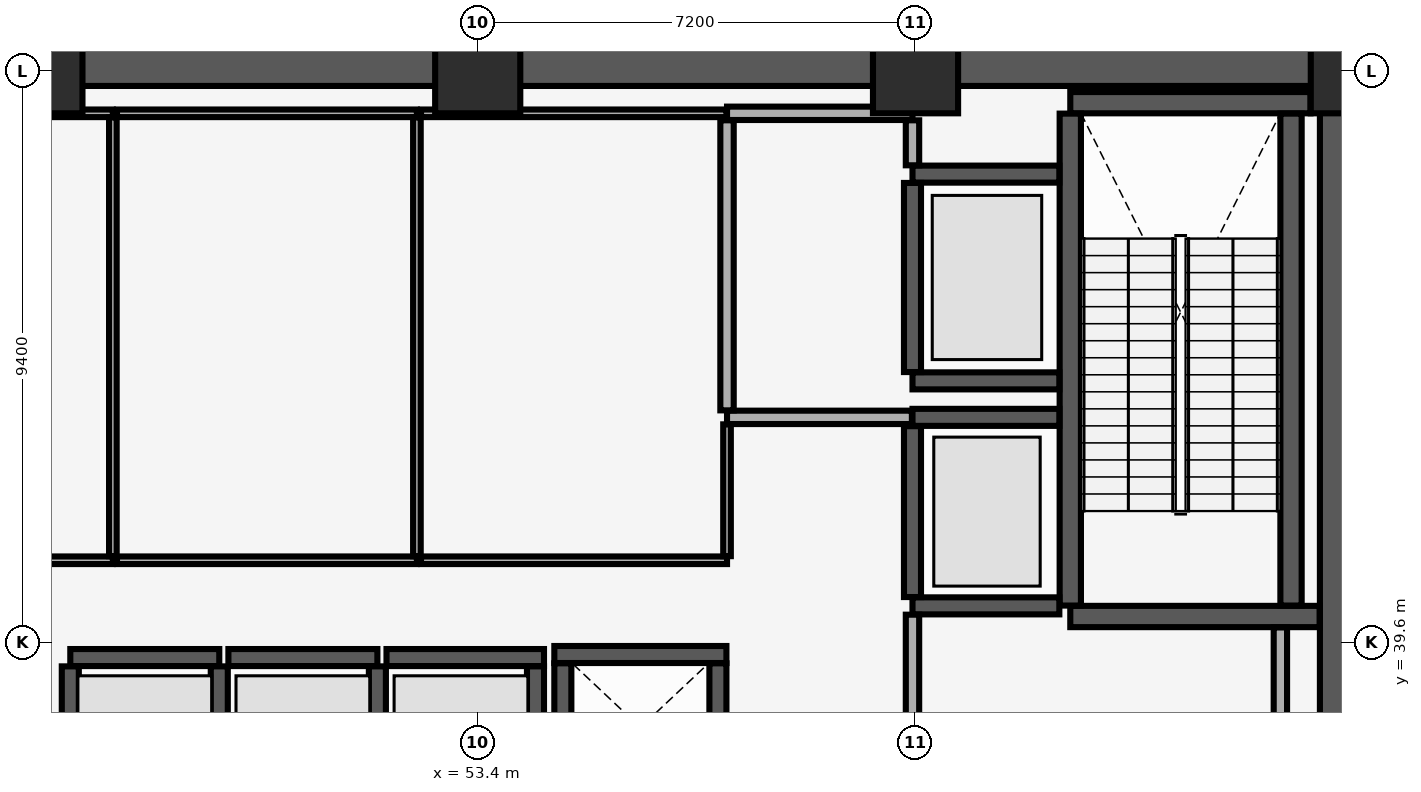
"""IFC4 building model, lengths in metres.
Left out: names, types, materials, properties, quantities, classifications, styles, units other than length and angle.
Written with IfcOpenShell. Run it as: python <this file> out.ifc"""

import sys

from ifc_helpers import new_model, si_unit, direction, frame, frame_2d, origin, origin_2d, place, context, subcontext, project, spatial, rectangle, extrude, element, fill, save


model = new_model("IFC4")
c1 = context("Model", 3, precision=1e-05, world=origin(), true_north=direction((0.0, 1.0)))
c2 = subcontext(c1, "Body", "Model", "MODEL_VIEW")
j1 = project(units=[si_unit("LENGTHUNIT", "METRE"), si_unit("PLANEANGLEUNIT", "RADIAN")], contexts=[c1])
p1 = place(None, origin())
s1 = spatial("IfcSite", under=j1, at=p1, CompositionType="ELEMENT")
p2 = place(p1, origin())
s2 = spatial("IfcBuilding", under=s1, at=p2, CompositionType="ELEMENT")
p3 = place(p2, frame((0.0, 0.0, 8.0)))
s3 = spatial("IfcBuildingStorey", under=s2, at=p3, CompositionType="ELEMENT", Elevation=8.0)
for number, where, z_axis, x_axis in (
    (1, (46.2, 49.0, 0.0), (0.0, 0.0, 1.0), (1.0, 0.0, 0.0)),
    (2, (53.4, 49.0, 0.0), (0.0, 0.0, 1.0), (1.0, 0.0, 0.0)),
    (3, (60.6, 49.0, 0.0), (0.0, 0.0, 1.0), (1.0, 0.0, 0.0)),
    (4, (67.8, 49.0, 0.0), (0.0, 0.0, 1.0), (1.0, 0.0, 0.0)),
):
    element("IfcColumn", number, at=place(p3, frame(where, z_axis=z_axis, x_axis=x_axis)), inside=s3, PredefinedType="COLUMN", context=c2, shape_type="SweptSolid", body=[
        extrude(rectangle(XDim=1.4, YDim=1.4, at=origin_2d()), origin(), (0.0, 0.0, 1.0), 5.68),
    ])
p4 = place(p3, frame((16.2, 49.3, 0.0), z_axis=(0.0, 0.0, 1.0), x_axis=(1.0, 0.0, 0.0)))
e5 = element("IfcWall", 5, at=p4, inside=s3, PredefinedType="SHEAR", context=c2, shape_type="SweptSolid", body=[
    extrude(rectangle(XDim=51.6, YDim=1.1, at=frame_2d((25.8, 0.0))), origin(), (0.0, 0.0, 1.0), 5.68),
])
p5 = place(p3, frame((67.8, 29.4, 0.0), z_axis=(0.0, 0.0, 1.0), x_axis=(0.0, 1.0, 0.0)))
e6 = element("IfcWall", 6, at=p5, inside=s3, PredefinedType="SHEAR", context=c2, shape_type="SweptSolid", body=[
    extrude(rectangle(XDim=19.2, YDim=1.1, at=frame_2d((9.6, 0.0))), origin(), (0.0, 0.0, 1.0), 5.68),
])
p6 = place(p3, frame((63.145, 40.025, 0.0), z_axis=(0.0, 0.0, 1.0), x_axis=(1.0, 0.0, 0.0)))
e7 = element("IfcWall", 7, at=p6, inside=s3, PredefinedType="SHEAR", context=c2, shape_type="SweptSolid", body=[
    extrude(rectangle(XDim=4.1, YDim=0.35, at=frame_2d((2.05, 0.0))), origin(), (0.0, 0.0, 1.0), 5.68),
])
p7 = place(p6, frame((1.24, 0.0, 0.0)))
e8 = element("IfcOpeningElement", 8, at=p7, cuts=e7, PredefinedType="OPENING", context=c2, shape_type="SweptSolid", body=[
    extrude(rectangle(XDim=1.15, YDim=2.15, at=frame_2d((0.575, 1.075))), frame((0.0, 0.185, 0.0), z_axis=(0.0, -1.0, 0.0), x_axis=(1.0, 0.0, 0.0)), (0.0, 0.0, 1.0), 0.37),
])
p8 = place(p3, frame((63.145, 48.475, 0.0), z_axis=(0.0, 0.0, 1.0), x_axis=(1.0, 0.0, 0.0)))
e9 = element("IfcWall", 9, at=p8, inside=s3, PredefinedType="SHEAR", context=c2, shape_type="SweptSolid", body=[
    extrude(rectangle(XDim=3.95, YDim=0.35, at=frame_2d((1.975, 0.0))), origin(), (0.0, 0.0, 1.0), 5.68),
])
for number, where, z_axis, x_axis in (
    (10, (63.145, 40.205, 0.0), (0.0, 0.0, 1.0), (0.0, 1.0, 0.0)),
    (11, (66.775, 40.205, 0.0), (0.0, 0.0, 1.0), (0.0, 1.0, 0.0)),
):
    element("IfcWall", number, at=place(p3, frame(where, z_axis=z_axis, x_axis=x_axis)), inside=s3, PredefinedType="SHEAR", context=c2, shape_type="SweptSolid", body=[
        extrude(rectangle(XDim=8.09, YDim=0.35, at=frame_2d((4.045, 0.0))), origin(), (0.0, 0.0, 1.0), 5.68),
    ])
p9 = place(p3, frame((46.7, 39.35, 0.0), z_axis=(0.0, 0.0, 1.0), x_axis=(1.0, 0.0, 0.0)))
e12 = element("IfcWall", 12, at=p9, inside=s3, PredefinedType="SHEAR", context=c2, shape_type="SweptSolid", body=[
    extrude(rectangle(XDim=2.45, YDim=0.28, at=frame_2d((1.225, 0.0))), origin(), (0.0, 0.0, 1.0), 5.68),
])
p10 = place(p9, frame((0.625, 0.0, 0.0)))
e13 = element("IfcOpeningElement", 13, at=p10, cuts=e12, PredefinedType="OPENING", context=c2, shape_type="SweptSolid", body=[
    extrude(rectangle(XDim=1.2, YDim=2.25, at=frame_2d((0.6, 1.125))), frame((0.0, 0.15, 0.0), z_axis=(0.0, -1.0, 0.0), x_axis=(1.0, 0.0, 0.0)), (0.0, 0.0, 1.0), 0.3),
])
for number, where, z_axis, x_axis in (
    (14, (46.7, 37.145, 0.0), (0.0, 0.0, 1.0), (0.0, 1.0, 0.0)),
    (15, (49.15, 37.145, 0.0), (0.0, 0.0, 1.0), (0.0, 1.0, 0.0)),
):
    element("IfcWall", number, at=place(p3, frame(where, z_axis=z_axis, x_axis=x_axis)), inside=s3, PredefinedType="SHEAR", context=c2, shape_type="SweptSolid", body=[
        extrude(rectangle(XDim=2.06, YDim=0.28, at=frame_2d((1.03, 0.0))), origin(), (0.0, 0.0, 1.0), 5.68),
    ])
p11 = place(p3, frame((49.3, 39.35, 0.0), z_axis=(0.0, 0.0, 1.0), x_axis=(1.0, 0.0, 0.0)))
e16 = element("IfcWall", 16, at=p11, inside=s3, PredefinedType="SHEAR", context=c2, shape_type="SweptSolid", body=[
    extrude(rectangle(XDim=2.45, YDim=0.28, at=frame_2d((1.225, 0.0))), origin(), (0.0, 0.0, 1.0), 5.68),
])
p12 = place(p11, frame((0.625, 0.0, 0.0)))
e17 = element("IfcOpeningElement", 17, at=p12, cuts=e16, PredefinedType="OPENING", context=c2, shape_type="SweptSolid", body=[
    extrude(rectangle(XDim=1.2, YDim=2.25, at=frame_2d((0.6, 1.125))), frame((0.0, 0.15, 0.0), z_axis=(0.0, -1.0, 0.0), x_axis=(1.0, 0.0, 0.0)), (0.0, 0.0, 1.0), 0.3),
])
p13 = place(p3, frame((51.75, 37.145, 0.0), z_axis=(0.0, 0.0, 1.0), x_axis=(0.0, 1.0, 0.0)))
e18 = element("IfcWall", 18, at=p13, inside=s3, PredefinedType="SHEAR", context=c2, shape_type="SweptSolid", body=[
    extrude(rectangle(XDim=2.06, YDim=0.28, at=frame_2d((1.03, 0.0))), origin(), (0.0, 0.0, 1.0), 5.68),
])
p14 = place(p3, frame((51.9, 39.35, 0.0), z_axis=(0.0, 0.0, 1.0), x_axis=(1.0, 0.0, 0.0)))
e19 = element("IfcWall", 19, at=p14, inside=s3, PredefinedType="SHEAR", context=c2, shape_type="SweptSolid", body=[
    extrude(rectangle(XDim=2.59, YDim=0.28, at=frame_2d((1.295, 0.0))), origin(), (0.0, 0.0, 1.0), 5.68),
])
p15 = place(p14, frame((0.625, 0.0, 0.0)))
e20 = element("IfcOpeningElement", 20, at=p15, cuts=e19, PredefinedType="OPENING", context=c2, shape_type="SweptSolid", body=[
    extrude(rectangle(XDim=1.2, YDim=2.25, at=frame_2d((0.6, 1.125))), frame((0.0, 0.15, 0.0), z_axis=(0.0, -1.0, 0.0), x_axis=(1.0, 0.0, 0.0)), (0.0, 0.0, 1.0), 0.3),
])
p16 = place(p3, frame((54.35, 37.145, 0.0), z_axis=(0.0, 0.0, 1.0), x_axis=(0.0, 1.0, 0.0)))
e21 = element("IfcWall", 21, at=p16, inside=s3, PredefinedType="SHEAR", context=c2, shape_type="SweptSolid", body=[
    extrude(rectangle(XDim=2.06, YDim=0.28, at=frame_2d((1.03, 0.0))), origin(), (0.0, 0.0, 1.0), 5.68),
])
p17 = place(p3, frame((54.66, 39.4, 0.0), z_axis=(0.0, 0.0, 1.0), x_axis=(1.0, 0.0, 0.0)))
e22 = element("IfcWall", 22, at=p17, inside=s3, PredefinedType="SHEAR", context=c2, shape_type="SweptSolid", body=[
    extrude(rectangle(XDim=2.83, YDim=0.28, at=frame_2d((1.415, 0.0))), origin(), (0.0, 0.0, 1.0), 5.68),
])
for number, where, z_axis, x_axis in (
    (23, (54.8, 37.145, 0.0), (0.0, 0.0, 1.0), (0.0, 1.0, 0.0)),
    (24, (57.35, 37.145, 0.0), (0.0, 0.0, 1.0), (0.0, 1.0, 0.0)),
):
    element("IfcWall", number, at=place(p3, frame(where, z_axis=z_axis, x_axis=x_axis)), inside=s3, PredefinedType="SHEAR", context=c2, shape_type="SweptSolid", body=[
        extrude(rectangle(XDim=2.11, YDim=0.28, at=frame_2d((1.055, 0.0))), origin(), (0.0, 0.0, 1.0), 5.68),
    ])
p18 = place(p3, frame((60.55, 40.2, 0.0), z_axis=(0.0, 0.0, 1.0), x_axis=(1.0, 0.0, 0.0)))
e25 = element("IfcWall", 25, at=p18, inside=s3, PredefinedType="SHEAR", context=c2, shape_type="SweptSolid", body=[
    extrude(rectangle(XDim=2.415, YDim=0.28, at=frame_2d((1.208, 0.0))), origin(), (0.0, 0.0, 1.0), 5.68),
])
p19 = place(p18, frame((0.575, 0.0, 0.0)))
e26 = element("IfcOpeningElement", 26, at=p19, cuts=e25, PredefinedType="OPENING", context=c2, shape_type="SweptSolid", body=[
    extrude(rectangle(XDim=1.3, YDim=2.3, at=frame_2d((0.65, 1.15))), frame((0.0, 0.15, 0.0), z_axis=(0.0, -1.0, 0.0), x_axis=(1.0, 0.0, 0.0)), (0.0, 0.0, 1.0), 0.3),
])
p20 = place(p3, frame((60.55, 43.3, 0.0), z_axis=(0.0, 0.0, 1.0), x_axis=(1.0, 0.0, 0.0)))
e27 = element("IfcWall", 27, at=p20, inside=s3, PredefinedType="SHEAR", context=c2, shape_type="SweptSolid", body=[
    extrude(rectangle(XDim=2.415, YDim=0.28, at=frame_2d((1.208, 0.0))), origin(), (0.0, 0.0, 1.0), 5.68),
])
p21 = place(p3, frame((60.55, 40.345, 0.0), z_axis=(0.0, 0.0, 1.0), x_axis=(0.0, 1.0, 0.0)))
e28 = element("IfcWall", 28, at=p21, inside=s3, PredefinedType="SHEAR", context=c2, shape_type="SweptSolid", body=[
    extrude(rectangle(XDim=2.81, YDim=0.28, at=frame_2d((1.405, 0.0))), origin(), (0.0, 0.0, 1.0), 5.68),
])
for number, where, z_axis, x_axis in (
    (29, (60.55, 43.9, 0.0), (0.0, 0.0, 1.0), (1.0, 0.0, 0.0)),
    (30, (60.55, 47.3, 0.0), (0.0, 0.0, 1.0), (1.0, 0.0, 0.0)),
):
    element("IfcWall", number, at=place(p3, frame(where, z_axis=z_axis, x_axis=x_axis)), inside=s3, PredefinedType="SHEAR", context=c2, shape_type="SweptSolid", body=[
        extrude(rectangle(XDim=2.415, YDim=0.28, at=frame_2d((1.208, 0.0))), origin(), (0.0, 0.0, 1.0), 5.68),
    ])
p22 = place(p3, frame((60.55, 44.045, 0.0), z_axis=(0.0, 0.0, 1.0), x_axis=(0.0, 1.0, 0.0)))
e31 = element("IfcWall", 31, at=p22, inside=s3, PredefinedType="SHEAR", context=c2, shape_type="SweptSolid", body=[
    extrude(rectangle(XDim=3.11, YDim=0.28, at=frame_2d((1.555, 0.0))), origin(), (0.0, 0.0, 1.0), 5.68),
])
p23 = place(p22, frame((0.905, 0.0, 0.0)))
e32 = element("IfcOpeningElement", 32, at=p23, cuts=e31, PredefinedType="OPENING", context=c2, shape_type="SweptSolid", body=[
    extrude(rectangle(XDim=1.3, YDim=2.3, at=frame_2d((0.65, 1.15))), frame((0.0, 0.15, 0.0), z_axis=(0.0, -1.0, 0.0), x_axis=(1.0, 0.0, 0.0)), (0.0, 0.0, 1.0), 0.3),
])
p24 = place(p3, frame((60.55, 34.415, 0.0), z_axis=(0.0, 0.0, 1.0), x_axis=(0.0, 1.0, 0.0)))
e33 = element("IfcWall", 33, at=p24, inside=s3, PredefinedType="PARTITIONING", context=c2, shape_type="SweptSolid", body=[
    extrude(rectangle(XDim=5.64, YDim=0.22, at=frame_2d((2.82, 0.0))), origin(), (0.0, 0.0, 1.0), 5.68),
])
p25 = place(p3, frame((66.6, 34.415, 0.0), z_axis=(0.0, 0.0, 1.0), x_axis=(0.0, 1.0, 0.0)))
e34 = element("IfcWall", 34, at=p25, inside=s3, PredefinedType="PARTITIONING", context=c2, shape_type="SweptSolid", body=[
    extrude(rectangle(XDim=5.43, YDim=0.22, at=frame_2d((2.715, 0.0))), origin(), (0.0, 0.0, 1.0), 5.68),
])
p26 = place(p3, frame((57.5, 43.3, 0.0), z_axis=(0.0, 0.0, 1.0), x_axis=(1.0, 0.0, 0.0)))
e35 = element("IfcWall", 35, at=p26, inside=s3, PredefinedType="PARTITIONING", context=c2, shape_type="SweptSolid", body=[
    extrude(rectangle(XDim=3.04, YDim=0.22, at=frame_2d((1.52, 0.0))), origin(), (0.0, 0.0, 1.0), 5.68),
])
p27 = place(p26, frame((0.9, 0.0, 0.0)))
e36 = element("IfcOpeningElement", 36, at=p27, cuts=e35, PredefinedType="OPENING", context=c2, shape_type="SweptSolid", body=[
    extrude(rectangle(XDim=1.2, YDim=2.15, at=frame_2d((0.6, 1.075))), frame((0.0, 0.12, 0.0), z_axis=(0.0, -1.0, 0.0), x_axis=(1.0, 0.0, 0.0)), (0.0, 0.0, 1.0), 0.24),
])
p28 = place(p3, frame((57.5, 48.3, 0.0), z_axis=(0.0, 0.0, 1.0), x_axis=(1.0, 0.0, 0.0)))
e37 = element("IfcWall", 37, at=p28, inside=s3, PredefinedType="PARTITIONING", context=c2, shape_type="SweptSolid", body=[
    extrude(rectangle(XDim=3.05, YDim=0.22, at=frame_2d((1.525, 0.0))), origin(), (0.0, 0.0, 1.0), 5.68),
])
p29 = place(p3, frame((57.5, 43.415, 0.0), z_axis=(0.0, 0.0, 1.0), x_axis=(0.0, 1.0, 0.0)))
e38 = element("IfcWall", 38, at=p29, inside=s3, PredefinedType="PARTITIONING", context=c2, shape_type="SweptSolid", body=[
    extrude(rectangle(XDim=4.77, YDim=0.22, at=frame_2d((2.385, 0.0))), origin(), (0.0, 0.0, 1.0), 5.68),
])
p30 = place(p3, frame((60.55, 47.445, 0.0), z_axis=(0.0, 0.0, 1.0), x_axis=(0.0, 1.0, 0.0)))
e39 = element("IfcWall", 39, at=p30, inside=s3, PredefinedType="PARTITIONING", context=c2, shape_type="SweptSolid", body=[
    extrude(rectangle(XDim=0.74, YDim=0.22, at=frame_2d((0.37, 0.0))), origin(), (0.0, 0.0, 1.0), 5.68),
])
p31 = place(p3, frame((44.3, 40.95, 0.0), z_axis=(0.0, 0.0, 1.0), x_axis=(1.0, 0.0, 0.0)))
e40 = element("IfcWall", 40, at=p31, inside=s3, PredefinedType="PARTITIONING", context=c2, shape_type="SweptSolid", body=[
    extrude(rectangle(XDim=3.1, YDim=0.125, at=frame_2d((1.55, 0.0))), origin(), (0.0, 0.0, 1.0), 5.68),
])
p32 = place(p31, frame((1.1, 0.0, 0.0)))
e41 = element("IfcOpeningElement", 41, at=p32, cuts=e40, PredefinedType="OPENING", context=c2, shape_type="SweptSolid", body=[
    extrude(rectangle(XDim=0.9, YDim=2.1, at=frame_2d((0.45, 1.05))), frame((0.0, 0.073, 0.0), z_axis=(0.0, -1.0, 0.0), x_axis=(1.0, 0.0, 0.0)), (0.0, 0.0, 1.0), 0.145),
])
p33 = place(p3, frame((44.3, 48.3, 0.0), z_axis=(0.0, 0.0, 1.0), x_axis=(1.0, 0.0, 0.0)))
e42 = element("IfcWall", 42, at=p33, inside=s3, PredefinedType="PARTITIONING", context=c2, shape_type="SweptSolid", body=[
    extrude(rectangle(XDim=3.1, YDim=0.125, at=frame_2d((1.55, 0.0))), origin(), (0.0, 0.0, 1.0), 5.68),
])
p34 = place(p3, frame((47.4, 41.018, 0.0), z_axis=(0.0, 0.0, 1.0), x_axis=(0.0, 1.0, 0.0)))
e43 = element("IfcWall", 43, at=p34, inside=s3, PredefinedType="PARTITIONING", context=c2, shape_type="SweptSolid", body=[
    extrude(rectangle(XDim=7.215, YDim=0.125, at=frame_2d((3.607, 0.0))), origin(), (0.0, 0.0, 1.0), 5.68),
])
p35 = place(p3, frame((47.468, 40.95, 0.0), z_axis=(0.0, 0.0, 1.0), x_axis=(1.0, 0.0, 0.0)))
e44 = element("IfcWall", 44, at=p35, inside=s3, PredefinedType="PARTITIONING", context=c2, shape_type="SweptSolid", body=[
    extrude(rectangle(XDim=4.932, YDim=0.125, at=frame_2d((2.466, 0.0))), origin(), (0.0, 0.0, 1.0), 5.68),
])
p36 = place(p35, frame((1.982, 0.0, 0.0)))
e45 = element("IfcOpeningElement", 45, at=p36, cuts=e44, PredefinedType="OPENING", context=c2, shape_type="SweptSolid", body=[
    extrude(rectangle(XDim=0.9, YDim=2.1, at=frame_2d((0.45, 1.05))), frame((0.0, 0.073, 0.0), z_axis=(0.0, -1.0, 0.0), x_axis=(1.0, 0.0, 0.0)), (0.0, 0.0, 1.0), 0.145),
])
p37 = place(p3, frame((47.468, 48.3, 0.0), z_axis=(0.0, 0.0, 1.0), x_axis=(1.0, 0.0, 0.0)))
e46 = element("IfcWall", 46, at=p37, inside=s3, PredefinedType="PARTITIONING", context=c2, shape_type="SweptSolid", body=[
    extrude(rectangle(XDim=4.932, YDim=0.125, at=frame_2d((2.466, 0.0))), origin(), (0.0, 0.0, 1.0), 5.68),
])
p38 = place(p3, frame((52.4, 41.018, 0.0), z_axis=(0.0, 0.0, 1.0), x_axis=(0.0, 1.0, 0.0)))
e47 = element("IfcWall", 47, at=p38, inside=s3, PredefinedType="PARTITIONING", context=c2, shape_type="SweptSolid", body=[
    extrude(rectangle(XDim=7.215, YDim=0.125, at=frame_2d((3.607, 0.0))), origin(), (0.0, 0.0, 1.0), 5.68),
])
p39 = place(p3, frame((52.468, 40.95, 0.0), z_axis=(0.0, 0.0, 1.0), x_axis=(1.0, 0.0, 0.0)))
e48 = element("IfcWall", 48, at=p39, inside=s3, PredefinedType="PARTITIONING", context=c2, shape_type="SweptSolid", body=[
    extrude(rectangle(XDim=5.032, YDim=0.125, at=frame_2d((2.516, 0.0))), origin(), (0.0, 0.0, 1.0), 5.68),
])
p40 = place(p39, frame((2.032, 0.0, 0.0)))
e49 = element("IfcOpeningElement", 49, at=p40, cuts=e48, PredefinedType="OPENING", context=c2, shape_type="SweptSolid", body=[
    extrude(rectangle(XDim=0.9, YDim=2.1, at=frame_2d((0.45, 1.05))), frame((0.0, 0.073, 0.0), z_axis=(0.0, -1.0, 0.0), x_axis=(1.0, 0.0, 0.0)), (0.0, 0.0, 1.0), 0.145),
])
p41 = place(p3, frame((52.468, 48.3, 0.0), z_axis=(0.0, 0.0, 1.0), x_axis=(1.0, 0.0, 0.0)))
e50 = element("IfcWall", 50, at=p41, inside=s3, PredefinedType="PARTITIONING", context=c2, shape_type="SweptSolid", body=[
    extrude(rectangle(XDim=5.022, YDim=0.125, at=frame_2d((2.511, 0.0))), origin(), (0.0, 0.0, 1.0), 5.68),
])
p42 = place(p3, frame((57.5, 41.018, 0.0), z_axis=(0.0, 0.0, 1.0), x_axis=(0.0, 1.0, 0.0)))
e51 = element("IfcWall", 51, at=p42, inside=s3, PredefinedType="PARTITIONING", context=c2, shape_type="SweptSolid", body=[
    extrude(rectangle(XDim=2.167, YDim=0.125, at=frame_2d((1.084, 0.0))), origin(), (0.0, 0.0, 1.0), 5.68),
])
p43 = place(p7, origin())
e52 = element("IfcDoor", 52, at=p43, inside=s3, OperationType="SINGLE_SWING_LEFT", PredefinedType="DOOR", context=c2, shape_type="SweptSolid", body=[
    extrude(rectangle(XDim=1.15, YDim=2.15, at=frame_2d((0.575, 1.075))), frame((0.0, 0.025, 0.0), z_axis=(0.0, -1.0, 0.0), x_axis=(1.0, 0.0, 0.0)), (0.0, 0.0, 1.0), 0.05),
])
fill(e8, e52)
p44 = place(p10, origin())
e53 = element("IfcDoor", 53, at=p44, inside=s3, OperationType="DOUBLE_DOOR_SLIDING", PredefinedType="DOOR", context=c2, shape_type="SweptSolid", body=[
    extrude(rectangle(XDim=1.2, YDim=2.25, at=frame_2d((0.6, 1.125))), frame((0.0, 0.025, 0.0), z_axis=(0.0, -1.0, 0.0), x_axis=(1.0, 0.0, 0.0)), (0.0, 0.0, 1.0), 0.05),
])
fill(e13, e53)
p45 = place(p12, origin())
e54 = element("IfcDoor", 54, at=p45, inside=s3, OperationType="DOUBLE_DOOR_SLIDING", PredefinedType="DOOR", context=c2, shape_type="SweptSolid", body=[
    extrude(rectangle(XDim=1.2, YDim=2.25, at=frame_2d((0.6, 1.125))), frame((0.0, 0.025, 0.0), z_axis=(0.0, -1.0, 0.0), x_axis=(1.0, 0.0, 0.0)), (0.0, 0.0, 1.0), 0.05),
])
fill(e17, e54)
p46 = place(p15, origin())
e55 = element("IfcDoor", 55, at=p46, inside=s3, OperationType="DOUBLE_DOOR_SLIDING", PredefinedType="DOOR", context=c2, shape_type="SweptSolid", body=[
    extrude(rectangle(XDim=1.2, YDim=2.25, at=frame_2d((0.6, 1.125))), frame((0.0, 0.025, 0.0), z_axis=(0.0, -1.0, 0.0), x_axis=(1.0, 0.0, 0.0)), (0.0, 0.0, 1.0), 0.05),
])
fill(e20, e55)
p47 = place(p19, origin())
e56 = element("IfcDoor", 56, at=p47, inside=s3, OperationType="DOUBLE_DOOR_SLIDING", PredefinedType="DOOR", context=c2, shape_type="SweptSolid", body=[
    extrude(rectangle(XDim=1.3, YDim=2.3, at=frame_2d((0.65, 1.15))), frame((0.0, 0.025, 0.0), z_axis=(0.0, -1.0, 0.0), x_axis=(1.0, 0.0, 0.0)), (0.0, 0.0, 1.0), 0.05),
])
fill(e26, e56)
p48 = place(p23, origin())
e57 = element("IfcDoor", 57, at=p48, inside=s3, OperationType="DOUBLE_DOOR_SLIDING", PredefinedType="DOOR", context=c2, shape_type="SweptSolid", body=[
    extrude(rectangle(XDim=1.3, YDim=2.3, at=frame_2d((0.65, 1.15))), frame((0.0, 0.025, 0.0), z_axis=(0.0, -1.0, 0.0), x_axis=(1.0, 0.0, 0.0)), (0.0, 0.0, 1.0), 0.05),
])
fill(e32, e57)
p49 = place(p27, origin())
e58 = element("IfcDoor", 58, at=p49, inside=s3, OperationType="SINGLE_SWING_RIGHT", PredefinedType="DOOR", context=c2, shape_type="SweptSolid", body=[
    extrude(rectangle(XDim=1.2, YDim=2.15, at=frame_2d((0.6, 1.075))), frame((0.0, 0.025, 0.0), z_axis=(0.0, -1.0, 0.0), x_axis=(1.0, 0.0, 0.0)), (0.0, 0.0, 1.0), 0.05),
])
fill(e36, e58)
p50 = place(p36, origin())
e59 = element("IfcDoor", 59, at=p50, inside=s3, OperationType="SINGLE_SWING_LEFT", PredefinedType="DOOR", context=c2, shape_type="SweptSolid", body=[
    extrude(rectangle(XDim=0.9, YDim=2.1, at=frame_2d((0.45, 1.05))), frame((0.0, 0.025, 0.0), z_axis=(0.0, -1.0, 0.0), x_axis=(1.0, 0.0, 0.0)), (0.0, 0.0, 1.0), 0.05),
])
fill(e45, e59)
p51 = place(p40, origin())
e60 = element("IfcDoor", 60, at=p51, inside=s3, OperationType="SINGLE_SWING_RIGHT", PredefinedType="DOOR", context=c2, shape_type="SweptSolid", body=[
    extrude(rectangle(XDim=0.9, YDim=2.1, at=frame_2d((0.45, 1.05))), frame((0.0, 0.025, 0.0), z_axis=(0.0, -1.0, 0.0), x_axis=(1.0, 0.0, 0.0)), (0.0, 0.0, 1.0), 0.05),
])
fill(e49, e60)
save(model, sys.argv[1])
